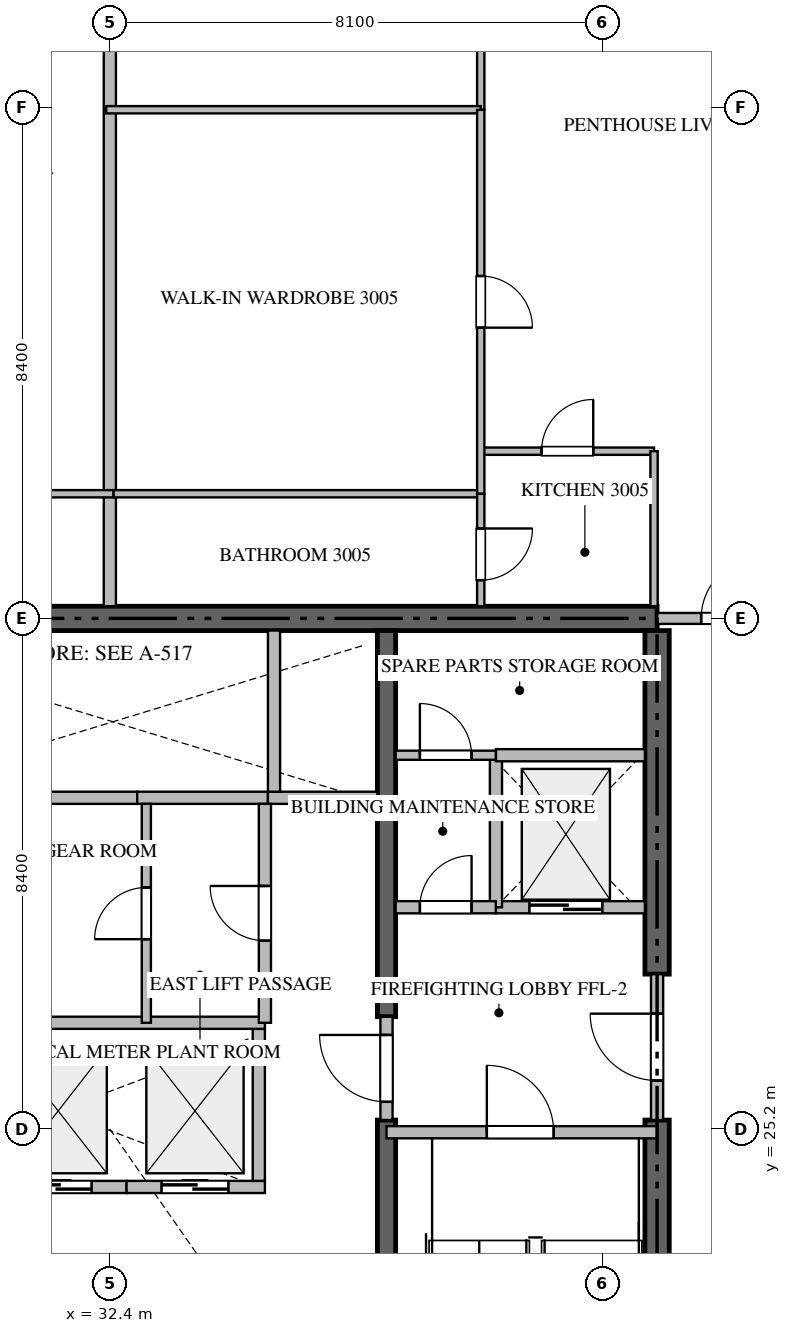
"""IFC4 building model, lengths in metres.
Left out: names, types, materials, properties, quantities, classifications, styles, units other than length and angle.
Written with IfcOpenShell. Run it as: python <this file> out.ifc"""

import sys

from ifc_helpers import new_model, si_unit, direction, frame, frame_2d, origin, place, context, subcontext, project, spatial, rectangle, extrude, source, transform, mapped, element, fill, save


model = new_model("IFC4")
c1 = context("Model", 3, precision=1e-05, world=origin(), true_north=direction((0.0, 1.0)))
c2 = subcontext(c1, "Body", "Model", "MODEL_VIEW")
j1 = project(units=[si_unit("LENGTHUNIT", "METRE"), si_unit("PLANEANGLEUNIT", "RADIAN")], contexts=[c1])
p1 = place(None, origin())
s1 = spatial("IfcSite", under=j1, at=p1, CompositionType="ELEMENT")
p2 = place(p1, origin())
s2 = spatial("IfcBuilding", under=s1, at=p2, CompositionType="ELEMENT")
p3 = place(p2, frame((0.0, 0.0, 123.9)))
s3 = spatial("IfcBuildingStorey", under=s2, at=p3, CompositionType="ELEMENT", Elevation=123.9)
p4 = place(p3, frame((41.4, 33.6, -0.26), z_axis=(0.0, 0.0, 1.0), x_axis=(-1.0, 0.0, 0.0)))
e1 = element("IfcWall", 1, at=p4, inside=s3, PredefinedType="SHEAR", context=c2, shape_type="SweptSolid", body=[
    extrude(rectangle(XDim=18.0, YDim=0.4, at=frame_2d((9.0, 0.0))), origin(), (0.0, 0.0, 1.0), 3.748),
])
p5 = place(p3, frame((41.4, 17.0, -0.26), z_axis=(0.0, 0.0, 1.0), x_axis=(0.0, 1.0, 0.0)))
e2 = element("IfcWall", 2, at=p5, inside=s3, PredefinedType="SHEAR", context=c2, shape_type="SweptSolid", body=[
    extrude(rectangle(XDim=8.35, YDim=0.4, at=frame_2d((4.175, 0.0))), origin(), (0.0, 0.0, 1.0), 3.748),
])
p6 = place(p3, frame((41.4, 27.75, -0.26), z_axis=(0.0, 0.0, 1.0), x_axis=(0.0, 1.0, 0.0)))
e3 = element("IfcWall", 3, at=p6, inside=s3, PredefinedType="SHEAR", context=c2, shape_type="SweptSolid", body=[
    extrude(rectangle(XDim=5.65, YDim=0.4, at=frame_2d((2.825, 0.0))), origin(), (0.0, 0.0, 1.0), 3.748),
])
p7 = place(p3, frame((36.95, 17.0, -0.26), z_axis=(0.0, 0.0, 1.0), x_axis=(0.0, 1.0, 0.0)))
e4 = element("IfcWall", 4, at=p7, inside=s3, PredefinedType="SHEAR", context=c2, shape_type="SweptSolid", body=[
    extrude(rectangle(XDim=8.35, YDim=0.3, at=frame_2d((4.175, 0.0))), origin(), (0.0, 0.0, 1.0), 3.748),
])
p8 = place(p3, frame((36.95, 27.05, -0.26), z_axis=(0.0, 0.0, 1.0), x_axis=(0.0, 1.0, 0.0)))
e5 = element("IfcWall", 5, at=p8, inside=s3, PredefinedType="SHEAR", context=c2, shape_type="SweptSolid", body=[
    extrude(rectangle(XDim=6.35, YDim=0.3, at=frame_2d((3.175, 0.0))), origin(), (0.0, 0.0, 1.0), 3.748),
])
p9 = place(p3, frame((36.95, 25.15, 0.0), z_axis=(0.0, 0.0, 1.0), x_axis=(1.0, 0.0, 0.0)))
e6 = element("IfcWall", 6, at=p9, inside=s3, PredefinedType="STANDARD", context=c2, shape_type="SweptSolid", body=[
    extrude(rectangle(XDim=4.45, YDim=0.2, at=frame_2d((2.225, 0.0))), origin(), (0.0, 0.0, 1.0), 3.49),
])
p10 = place(p9, frame((1.65, 0.0, 0.0)))
e7 = element("IfcOpeningElement", 7, at=p10, cuts=e6, PredefinedType="OPENING", context=c2, shape_type="SweptSolid", body=[
    extrude(rectangle(XDim=1.1, YDim=2.15, at=frame_2d((0.55, 1.075))), frame((0.0, 0.11, 0.0), z_axis=(0.0, -1.0, 0.0), x_axis=(1.0, 0.0, 0.0)), (0.0, 0.0, 1.0), 0.22),
])
p11 = place(p3, frame((38.75, 28.85, 0.0), z_axis=(0.0, 0.0, 1.0), x_axis=(1.0, 0.0, 0.0)))
e8 = element("IfcWall", 8, at=p11, inside=s3, PredefinedType="STANDARD", context=c2, shape_type="SweptSolid", body=[
    extrude(rectangle(XDim=2.45, YDim=0.2, at=frame_2d((1.225, 0.0))), origin(), (0.0, 0.0, 1.0), 3.49),
])
p12 = place(p11, frame((0.55, 0.0, 0.0)))
e9 = element("IfcOpeningElement", 9, at=p12, cuts=e8, PredefinedType="OPENING", context=c2, shape_type="SweptSolid", body=[
    extrude(rectangle(XDim=1.2, YDim=2.2, at=frame_2d((0.6, 1.1))), frame((0.0, 0.11, 0.0), z_axis=(0.0, -1.0, 0.0), x_axis=(1.0, 0.0, 0.0)), (0.0, 0.0, 1.0), 0.22),
])
p13 = place(p3, frame((30.425, 24.25, 0.0), z_axis=(0.0, 0.0, 1.0), x_axis=(1.0, 0.0, 0.0)))
e10 = element("IfcWall", 10, at=p13, inside=s3, PredefinedType="STANDARD", context=c2, shape_type="SweptSolid", body=[
    extrude(rectangle(XDim=2.25, YDim=0.2, at=frame_2d((1.125, 0.0))), origin(), (0.0, 0.0, 1.0), 3.49),
])
p14 = place(p13, frame((0.575, 0.0, 0.0)))
e11 = element("IfcOpeningElement", 11, at=p14, cuts=e10, PredefinedType="OPENING", context=c2, shape_type="SweptSolid", body=[
    extrude(rectangle(XDim=1.1, YDim=2.2, at=frame_2d((0.55, 1.1))), frame((0.0, 0.11, 0.0), z_axis=(0.0, -1.0, 0.0), x_axis=(1.0, 0.0, 0.0)), (0.0, 0.0, 1.0), 0.22),
])
p15 = place(p3, frame((32.675, 24.25, 0.0), z_axis=(0.0, 0.0, 1.0), x_axis=(1.0, 0.0, 0.0)))
e12 = element("IfcWall", 12, at=p15, inside=s3, PredefinedType="STANDARD", context=c2, shape_type="SweptSolid", body=[
    extrude(rectangle(XDim=2.275, YDim=0.2, at=frame_2d((1.137, 0.0))), origin(), (0.0, 0.0, 1.0), 3.49),
])
p16 = place(p15, frame((0.575, 0.0, 0.0)))
e13 = element("IfcOpeningElement", 13, at=p16, cuts=e12, PredefinedType="OPENING", context=c2, shape_type="SweptSolid", body=[
    extrude(rectangle(XDim=1.1, YDim=2.2, at=frame_2d((0.55, 1.1))), frame((0.0, 0.11, 0.0), z_axis=(0.0, -1.0, 0.0), x_axis=(1.0, 0.0, 0.0)), (0.0, 0.0, 1.0), 0.22),
])
p17 = place(p3, frame((34.85, 24.35, 0.0), z_axis=(0.0, 0.0, 1.0), x_axis=(0.0, 1.0, 0.0)))
e14 = element("IfcWall", 14, at=p17, inside=s3, PredefinedType="STANDARD", context=c2, shape_type="SweptSolid", body=[
    extrude(rectangle(XDim=2.5, YDim=0.2, at=frame_2d((1.25, 0.0))), origin(), (0.0, 0.0, 1.0), 3.49),
])
p18 = place(p3, frame((30.55, 30.65, 0.0), z_axis=(0.0, 0.0, 1.0), x_axis=(1.0, 0.0, 0.0)))
e15 = element("IfcWall", 15, at=p18, inside=s3, PredefinedType="STANDARD", context=c2, shape_type="SweptSolid", body=[
    extrude(rectangle(XDim=2.3, YDim=0.2, at=frame_2d((1.15, 0.0))), origin(), (0.0, 0.0, 1.0), 3.49),
])
p19 = place(p3, frame((32.85, 30.65, 0.0), z_axis=(0.0, 0.0, 1.0), x_axis=(1.0, 0.0, 0.0)))
e16 = element("IfcWall", 16, at=p19, inside=s3, PredefinedType="STANDARD", context=c2, shape_type="SweptSolid", body=[
    extrude(rectangle(XDim=2.15, YDim=0.2, at=frame_2d((1.075, 0.0))), origin(), (0.0, 0.0, 1.0), 3.49),
])
p20 = place(p3, frame((35.0, 30.65, 0.0), z_axis=(0.0, 0.0, 1.0), x_axis=(1.0, 0.0, 0.0)))
e17 = element("IfcWall", 17, at=p20, inside=s3, PredefinedType="STANDARD", context=c2, shape_type="SweptSolid", body=[
    extrude(rectangle(XDim=1.8, YDim=0.2, at=frame_2d((0.9, 0.0))), origin(), (0.0, 0.0, 1.0), 3.49),
])
p21 = place(p3, frame((35.1, 30.75, 0.0), z_axis=(0.0, 0.0, 1.0), x_axis=(0.0, 1.0, 0.0)))
e18 = element("IfcWall", 18, at=p21, inside=s3, PredefinedType="STANDARD", context=c2, shape_type="SweptSolid", body=[
    extrude(rectangle(XDim=2.65, YDim=0.2, at=frame_2d((1.325, 0.0))), origin(), (0.0, 0.0, 1.0), 3.49),
])
p22 = place(p3, frame((38.75, 28.85, 0.0), z_axis=(0.0, 0.0, 1.0), x_axis=(0.0, 1.0, 0.0)))
e19 = element("IfcWall", 19, at=p22, inside=s3, PredefinedType="STANDARD", context=c2, shape_type="SweptSolid", body=[
    extrude(rectangle(XDim=2.5, YDim=0.2, at=frame_2d((1.25, 0.0))), origin(), (0.0, 0.0, 1.0), 3.49),
])
p23 = place(p3, frame((38.75, 31.35, 0.0), z_axis=(0.0, 0.0, 1.0), x_axis=(1.0, 0.0, 0.0)))
e20 = element("IfcWall", 20, at=p23, inside=s3, PredefinedType="STANDARD", context=c2, shape_type="SweptSolid", body=[
    extrude(rectangle(XDim=2.45, YDim=0.2, at=frame_2d((1.225, 0.0))), origin(), (0.0, 0.0, 1.0), 3.49),
])
p24 = place(p3, frame((37.1, 28.85, 0.0), z_axis=(0.0, 0.0, 1.0), x_axis=(1.0, 0.0, 0.0)))
e21 = element("IfcWall", 21, at=p24, inside=s3, PredefinedType="STANDARD", context=c2, shape_type="SweptSolid", body=[
    extrude(rectangle(XDim=1.648, YDim=0.2, at=frame_2d((0.824, 0.0))), origin(), (0.0, 0.0, 1.0), 3.49),
])
p25 = place(p24, frame((0.399, 0.0, 0.0)))
e22 = element("IfcOpeningElement", 22, at=p25, cuts=e21, PredefinedType="OPENING", context=c2, shape_type="SweptSolid", body=[
    extrude(rectangle(XDim=0.85, YDim=2.1, at=frame_2d((0.425, 1.05))), frame((0.0, 0.11, 0.0), z_axis=(0.0, -1.0, 0.0), x_axis=(1.0, 0.0, 0.0)), (0.0, 0.0, 1.0), 0.22),
])
p26 = place(p3, frame((41.4, 25.352, 0.0), z_axis=(0.0, 0.0, 1.0), x_axis=(0.0, 1.0, 0.0)))
e23 = element("IfcWall", 23, at=p26, inside=s3, PredefinedType="STANDARD", context=c2, shape_type="SweptSolid", body=[
    extrude(rectangle(XDim=2.396, YDim=0.2, at=frame_2d((1.198, 0.0))), origin(), (0.0, 0.0, 1.0), 3.49),
])
p27 = place(p26, frame((0.648, 0.0, 0.0)))
e24 = element("IfcOpeningElement", 24, at=p27, cuts=e23, PredefinedType="OPENING", context=c2, shape_type="SweptSolid", body=[
    extrude(rectangle(XDim=1.1, YDim=2.15, at=frame_2d((0.55, 1.075))), frame((0.0, 0.11, 0.0), z_axis=(0.0, -1.0, 0.0), x_axis=(1.0, 0.0, 0.0)), (0.0, 0.0, 1.0), 0.22),
])
p28 = place(p3, frame((36.95, 25.352, 0.0), z_axis=(0.0, 0.0, 1.0), x_axis=(0.0, 1.0, 0.0)))
e25 = element("IfcWall", 25, at=p28, inside=s3, PredefinedType="STANDARD", context=c2, shape_type="SweptSolid", body=[
    extrude(rectangle(XDim=1.696, YDim=0.2, at=frame_2d((0.848, 0.0))), origin(), (0.0, 0.0, 1.0), 3.49),
])
p29 = place(p28, frame((0.298, 0.0, 0.0)))
e26 = element("IfcOpeningElement", 26, at=p29, cuts=e25, PredefinedType="OPENING", context=c2, shape_type="SweptSolid", body=[
    extrude(rectangle(XDim=1.1, YDim=2.15, at=frame_2d((0.55, 1.075))), frame((0.0, 0.11, 0.0), z_axis=(0.0, -1.0, 0.0), x_axis=(1.0, 0.0, 0.0)), (0.0, 0.0, 1.0), 0.22),
])
p30 = place(p3, frame((28.0, 26.95, 0.0), z_axis=(0.0, 0.0, 1.0), x_axis=(1.0, 0.0, 0.0)))
e27 = element("IfcWall", 27, at=p30, inside=s3, PredefinedType="STANDARD", context=c2, shape_type="SweptSolid", body=[
    extrude(rectangle(XDim=6.95, YDim=0.2, at=frame_2d((3.475, 0.0))), origin(), (0.0, 0.0, 1.0), 3.49),
])
p31 = place(p3, frame((37.1, 31.35, 0.0), z_axis=(0.0, 0.0, 1.0), x_axis=(1.0, 0.0, 0.0)))
e28 = element("IfcWall", 28, at=p31, inside=s3, PredefinedType="PARTITIONING", context=c2, shape_type="SweptSolid", body=[
    extrude(rectangle(XDim=1.648, YDim=0.15, at=frame_2d((0.824, 0.0))), origin(), (0.0, 0.0, 1.0), 3.49),
])
p32 = place(p31, frame((0.399, 0.0, 0.0)))
e29 = element("IfcOpeningElement", 29, at=p32, cuts=e28, PredefinedType="OPENING", context=c2, shape_type="SweptSolid", body=[
    extrude(rectangle(XDim=0.85, YDim=2.1, at=frame_2d((0.425, 1.05))), frame((0.0, 0.085, 0.0), z_axis=(0.0, -1.0, 0.0), x_axis=(1.0, 0.0, 0.0)), (0.0, 0.0, 1.0), 0.17),
])
p33 = place(p3, frame((34.95, 26.95, 0.0), z_axis=(0.0, 0.0, 1.0), x_axis=(0.0, 1.0, 0.0)))
e30 = element("IfcWall", 30, at=p33, inside=s3, PredefinedType="STANDARD", context=c2, shape_type="SweptSolid", body=[
    extrude(rectangle(XDim=3.6, YDim=0.2, at=frame_2d((1.8, 0.0))), origin(), (0.0, 0.0, 1.0), 3.49),
])
p34 = place(p33, frame((1.35, 0.0, 0.0)))
e31 = element("IfcOpeningElement", 31, at=p34, cuts=e30, PredefinedType="OPENING", context=c2, shape_type="SweptSolid", body=[
    extrude(rectangle(XDim=0.9, YDim=2.1, at=frame_2d((0.45, 1.05))), frame((0.0, 0.11, 0.0), z_axis=(0.0, -1.0, 0.0), x_axis=(1.0, 0.0, 0.0)), (0.0, 0.0, 1.0), 0.22),
])
p35 = place(p3, frame((33.0, 26.95, 0.0), z_axis=(0.0, 0.0, 1.0), x_axis=(0.0, 1.0, 0.0)))
e32 = element("IfcWall", 32, at=p35, inside=s3, PredefinedType="PARTITIONING", context=c2, shape_type="SweptSolid", body=[
    extrude(rectangle(XDim=3.6, YDim=0.15, at=frame_2d((1.8, 0.0))), origin(), (0.0, 0.0, 1.0), 3.49),
])
p36 = place(p35, frame((1.375, 0.0, 0.0)))
e33 = element("IfcOpeningElement", 33, at=p36, cuts=e32, PredefinedType="OPENING", context=c2, shape_type="SweptSolid", body=[
    extrude(rectangle(XDim=0.85, YDim=2.1, at=frame_2d((0.425, 1.05))), frame((0.0, 0.085, 0.0), z_axis=(0.0, -1.0, 0.0), x_axis=(1.0, 0.0, 0.0)), (0.0, 0.0, 1.0), 0.17),
])
p37 = place(p3, frame((32.4, 33.8, 0.0), z_axis=(0.0, 0.0, 1.0), x_axis=(0.0, 1.0, 0.0)))
e34 = element("IfcWall", 34, at=p37, inside=s3, PredefinedType="PARTITIONING", context=c2, shape_type="SweptSolid", body=[
    extrude(rectangle(XDim=15.118, YDim=0.2, at=frame_2d((7.559, 0.0))), origin(), (0.0, 0.0, 1.0), 3.49),
])
p38 = place(p3, frame((41.402, 33.6, 0.0), z_axis=(0.0, 0.0, 1.0), x_axis=(1.0, 0.0, 0.0)))
e35 = element("IfcWall", 35, at=p38, inside=s3, PredefinedType="PARTITIONING", context=c2, shape_type="SweptSolid", body=[
    extrude(rectangle(XDim=2.446, YDim=0.18, at=frame_2d((1.223, 0.0))), origin(), (0.0, 0.0, 1.0), 3.49),
])
p39 = place(p38, frame((0.723, 0.0, 0.0)))
e36 = element("IfcOpeningElement", 36, at=p39, cuts=e35, PredefinedType="OPENING", context=c2, shape_type="SweptSolid", body=[
    extrude(rectangle(XDim=1.0, YDim=2.15, at=frame_2d((0.5, 1.075))), frame((0.0, 0.1, 0.0), z_axis=(0.0, -1.0, 0.0), x_axis=(1.0, 0.0, 0.0)), (0.0, 0.0, 1.0), 0.2),
])
p40 = place(p3, frame((26.3, 35.65, 0.0), z_axis=(0.0, 0.0, 1.0), x_axis=(1.0, 0.0, 0.0)))
e37 = element("IfcWall", 37, at=p40, inside=s3, PredefinedType="PARTITIONING", context=c2, shape_type="SweptSolid", body=[
    extrude(rectangle(XDim=6.16, YDim=0.12, at=frame_2d((3.08, 0.0))), origin(), (0.0, 0.0, 1.0), 3.49),
])
p41 = place(p3, frame((38.5, 36.35, 0.0), z_axis=(0.0, 0.0, 1.0), x_axis=(1.0, 0.0, 0.0)))
e38 = element("IfcWall", 38, at=p41, inside=s3, PredefinedType="PARTITIONING", context=c2, shape_type="SweptSolid", body=[
    extrude(rectangle(XDim=2.85, YDim=0.12, at=frame_2d((1.425, 0.0))), origin(), (0.0, 0.0, 1.0), 3.49),
])
p42 = place(p41, frame((1.0, 0.0, 0.0)))
e39 = element("IfcOpeningElement", 39, at=p42, cuts=e38, PredefinedType="OPENING", context=c2, shape_type="SweptSolid", body=[
    extrude(rectangle(XDim=0.85, YDim=2.1, at=frame_2d((0.425, 1.05))), frame((0.0, 0.07, 0.0), z_axis=(0.0, -1.0, 0.0), x_axis=(1.0, 0.0, 0.0)), (0.0, 0.0, 1.0), 0.14),
])
p43 = place(p3, frame((41.35, 36.35, 0.0), z_axis=(0.0, 0.0, 1.0), x_axis=(0.0, -1.0, 0.0)))
e40 = element("IfcWall", 40, at=p43, inside=s3, PredefinedType="PARTITIONING", context=c2, shape_type="SweptSolid", body=[
    extrude(rectangle(XDim=2.55, YDim=0.12, at=frame_2d((1.275, 0.0))), origin(), (0.0, 0.0, 1.0), 3.49),
])
p44 = place(p3, frame((38.5, 48.905, 0.0), z_axis=(0.0, 0.0, 1.0), x_axis=(0.0, -1.0, 0.0)))
e41 = element("IfcWall", 41, at=p44, inside=s3, PredefinedType="PARTITIONING", context=c2, shape_type="SweptSolid", body=[
    extrude(rectangle(XDim=6.94, YDim=0.12, at=frame_2d((3.47, 0.0))), origin(), (0.0, 0.0, 1.0), 3.49),
])
p45 = place(p44, frame((3.322, 0.0, 0.0)))
e42 = element("IfcOpeningElement", 42, at=p45, cuts=e41, PredefinedType="OPENING", context=c2, shape_type="SweptSolid", body=[
    extrude(rectangle(XDim=0.9, YDim=2.1, at=frame_2d((0.45, 1.05))), frame((0.0, 0.07, 0.0), z_axis=(0.0, -1.0, 0.0), x_axis=(1.0, 0.0, 0.0)), (0.0, 0.0, 1.0), 0.14),
])
p46 = place(p3, frame((32.34, 41.965, 0.0), z_axis=(0.0, 0.0, 1.0), x_axis=(1.0, 0.0, 0.0)))
e43 = element("IfcWall", 43, at=p46, inside=s3, PredefinedType="PARTITIONING", context=c2, shape_type="SweptSolid", body=[
    extrude(rectangle(XDim=6.16, YDim=0.12, at=frame_2d((3.08, 0.0))), origin(), (0.0, 0.0, 1.0), 3.49),
])
p47 = place(p3, frame((32.462, 35.65, 0.0), z_axis=(0.0, 0.0, 1.0), x_axis=(1.0, 0.0, 0.0)))
e44 = element("IfcWall", 44, at=p47, inside=s3, PredefinedType="PARTITIONING", context=c2, shape_type="SweptSolid", body=[
    extrude(rectangle(XDim=6.038, YDim=0.12, at=frame_2d((3.019, 0.0))), origin(), (0.0, 0.0, 1.0), 3.49),
])
p48 = place(p3, frame((38.5, 41.963, 0.0), z_axis=(0.0, 0.0, 1.0), x_axis=(0.0, -1.0, 0.0)))
e45 = element("IfcWall", 45, at=p48, inside=s3, PredefinedType="PARTITIONING", context=c2, shape_type="SweptSolid", body=[
    extrude(rectangle(XDim=6.313, YDim=0.12, at=frame_2d((3.156, 0.0))), origin(), (0.0, 0.0, 1.0), 3.49),
])
p49 = place(p48, frame((2.732, 0.0, 0.0)))
e46 = element("IfcOpeningElement", 46, at=p49, cuts=e45, PredefinedType="OPENING", context=c2, shape_type="SweptSolid", body=[
    extrude(rectangle(XDim=0.85, YDim=2.1, at=frame_2d((0.425, 1.05))), frame((0.0, 0.07, 0.0), z_axis=(0.0, -1.0, 0.0), x_axis=(1.0, 0.0, 0.0)), (0.0, 0.0, 1.0), 0.14),
])
p50 = place(p3, frame((38.5, 35.648, 0.0), z_axis=(0.0, 0.0, 1.0), x_axis=(0.0, -1.0, 0.0)))
e47 = element("IfcWall", 47, at=p50, inside=s3, PredefinedType="PARTITIONING", context=c2, shape_type="SweptSolid", body=[
    extrude(rectangle(XDim=1.848, YDim=0.12, at=frame_2d((0.924, 0.0))), origin(), (0.0, 0.0, 1.0), 3.49),
])
p51 = place(p50, frame((0.569, 0.0, 0.0)))
e48 = element("IfcOpeningElement", 48, at=p51, cuts=e47, PredefinedType="OPENING", context=c2, shape_type="SweptSolid", body=[
    extrude(rectangle(XDim=0.85, YDim=2.1, at=frame_2d((0.425, 1.05))), frame((0.0, 0.07, 0.0), z_axis=(0.0, -1.0, 0.0), x_axis=(1.0, 0.0, 0.0)), (0.0, 0.0, 1.0), 0.14),
])
m1 = source(origin(), c2, "Body", "SweptSolid", [
    extrude(rectangle(XDim=1.1, YDim=2.15, at=frame_2d((0.55, 1.075))), frame((0.0, 0.025, 0.0), z_axis=(0.0, -1.0, 0.0), x_axis=(1.0, 0.0, 0.0)), (0.0, 0.0, 1.0), 0.05),
])
p52 = place(p10, origin())
e49 = element("IfcDoor", 49, at=p52, inside=s3, OperationType="SINGLE_SWING_LEFT", PredefinedType="DOOR", context=c2, shape_type="MappedRepresentation", body=[
    mapped(m1, transform((0.0, 0.0, 0.0), scale=1.0)),
])
fill(e7, e49)
m2 = source(origin(), c2, "Body", "SweptSolid", [
    extrude(rectangle(XDim=1.2, YDim=2.2, at=frame_2d((0.6, 1.1))), frame((0.0, 0.025, 0.0), z_axis=(0.0, -1.0, 0.0), x_axis=(1.0, 0.0, 0.0)), (0.0, 0.0, 1.0), 0.05),
])
p53 = place(p12, origin())
e50 = element("IfcDoor", 50, at=p53, inside=s3, OperationType="DOUBLE_DOOR_SLIDING", PredefinedType="DOOR", context=c2, shape_type="MappedRepresentation", body=[
    mapped(m2, transform((0.0, 0.0, 0.0), scale=1.0)),
])
fill(e9, e50)
m3 = source(origin(), c2, "Body", "SweptSolid", [
    extrude(rectangle(XDim=1.1, YDim=2.2, at=frame_2d((0.55, 1.1))), frame((0.0, 0.025, 0.0), z_axis=(0.0, -1.0, 0.0), x_axis=(1.0, 0.0, 0.0)), (0.0, 0.0, 1.0), 0.05),
])
p54 = place(p14, origin())
e51 = element("IfcDoor", 51, at=p54, inside=s3, OperationType="DOUBLE_DOOR_SLIDING", PredefinedType="DOOR", context=c2, shape_type="MappedRepresentation", body=[
    mapped(m3, transform((0.0, 0.0, 0.0), scale=1.0)),
])
fill(e11, e51)
p55 = place(p16, origin())
e52 = element("IfcDoor", 52, at=p55, inside=s3, OperationType="DOUBLE_DOOR_SLIDING", PredefinedType="DOOR", context=c2, shape_type="MappedRepresentation", body=[
    mapped(m3, transform((0.0, 0.0, 0.0), scale=1.0)),
])
fill(e13, e52)
m4 = source(origin(), c2, "Body", "SweptSolid", [
    extrude(rectangle(XDim=0.85, YDim=2.1, at=frame_2d((0.425, 1.05))), frame((0.0, 0.025, 0.0), z_axis=(0.0, -1.0, 0.0), x_axis=(1.0, 0.0, 0.0)), (0.0, 0.0, 1.0), 0.05),
])
p56 = place(p25, origin())
e53 = element("IfcDoor", 53, at=p56, inside=s3, OperationType="SINGLE_SWING_RIGHT", PredefinedType="DOOR", context=c2, shape_type="MappedRepresentation", body=[
    mapped(m4, transform((0.0, 0.0, 0.0), scale=1.0)),
])
fill(e22, e53)
p57 = place(p27, origin())
e54 = element("IfcDoor", 54, at=p57, inside=s3, OperationType="SINGLE_SWING_RIGHT", PredefinedType="DOOR", context=c2, shape_type="MappedRepresentation", body=[
    mapped(m1, transform((0.0, 0.0, 0.0), scale=1.0)),
])
fill(e24, e54)
p58 = place(p29, origin())
e55 = element("IfcDoor", 55, at=p58, inside=s3, OperationType="SINGLE_SWING_RIGHT", PredefinedType="DOOR", context=c2, shape_type="MappedRepresentation", body=[
    mapped(m1, transform((0.0, 0.0, 0.0), scale=1.0)),
])
fill(e26, e55)
p59 = place(p32, origin())
e56 = element("IfcDoor", 56, at=p59, inside=s3, OperationType="SINGLE_SWING_LEFT", PredefinedType="DOOR", context=c2, shape_type="MappedRepresentation", body=[
    mapped(m4, transform((0.0, 0.0, 0.0), scale=1.0)),
])
fill(e29, e56)
m5 = source(origin(), c2, "Body", "SweptSolid", [
    extrude(rectangle(XDim=0.9, YDim=2.1, at=frame_2d((0.45, 1.05))), frame((0.0, 0.025, 0.0), z_axis=(0.0, -1.0, 0.0), x_axis=(1.0, 0.0, 0.0)), (0.0, 0.0, 1.0), 0.05),
])
p60 = place(p34, origin())
e57 = element("IfcDoor", 57, at=p60, inside=s3, OperationType="SINGLE_SWING_RIGHT", PredefinedType="DOOR", context=c2, shape_type="MappedRepresentation", body=[
    mapped(m5, transform((0.0, 0.0, 0.0), scale=1.0)),
])
fill(e31, e57)
p61 = place(p36, origin())
e58 = element("IfcDoor", 58, at=p61, inside=s3, OperationType="SINGLE_SWING_LEFT", PredefinedType="DOOR", context=c2, shape_type="MappedRepresentation", body=[
    mapped(m4, transform((0.0, 0.0, 0.0), scale=1.0)),
])
fill(e33, e58)
m6 = source(origin(), c2, "Body", "SweptSolid", [
    extrude(rectangle(XDim=1.0, YDim=2.15, at=frame_2d((0.5, 1.075))), frame((0.0, 0.025, 0.0), z_axis=(0.0, -1.0, 0.0), x_axis=(1.0, 0.0, 0.0)), (0.0, 0.0, 1.0), 0.05),
])
p62 = place(p39, origin())
e59 = element("IfcDoor", 59, at=p62, inside=s3, OperationType="SINGLE_SWING_RIGHT", PredefinedType="DOOR", context=c2, shape_type="MappedRepresentation", body=[
    mapped(m6, transform((0.0, 0.0, 0.0), scale=1.0)),
])
fill(e36, e59)
p63 = place(p42, origin())
e60 = element("IfcDoor", 60, at=p63, inside=s3, OperationType="SINGLE_SWING_RIGHT", PredefinedType="DOOR", context=c2, shape_type="MappedRepresentation", body=[
    mapped(m4, transform((0.0, 0.0, 0.0), scale=1.0)),
])
fill(e39, e60)
p64 = place(p49, origin())
e61 = element("IfcDoor", 61, at=p64, inside=s3, OperationType="SINGLE_SWING_RIGHT", PredefinedType="DOOR", context=c2, shape_type="MappedRepresentation", body=[
    mapped(m4, transform((0.0, 0.0, 0.0), scale=1.0)),
])
fill(e46, e61)
p65 = place(p51, origin())
e62 = element("IfcDoor", 62, at=p65, inside=s3, OperationType="SINGLE_SWING_LEFT", PredefinedType="DOOR", context=c2, shape_type="MappedRepresentation", body=[
    mapped(m4, transform((0.0, 0.0, 0.0), scale=1.0)),
])
fill(e48, e62)
save(model, sys.argv[1])
